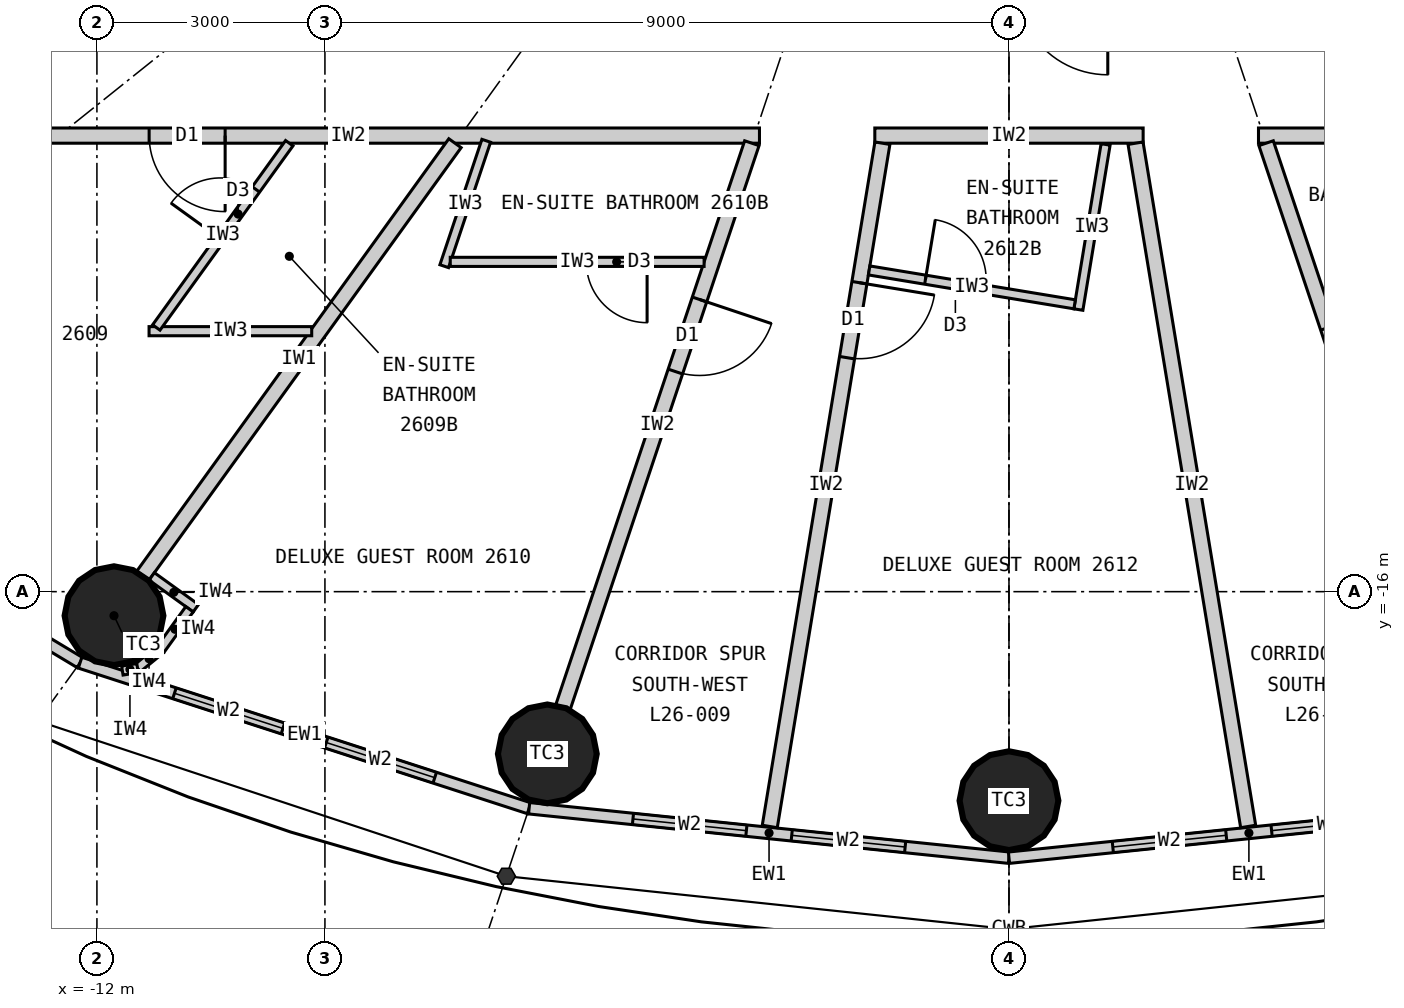
"""IFC4 building model, lengths in metres.
Left out: names, types, materials, properties, quantities, classifications, styles, units other than length and angle.
Written with IfcOpenShell. Run it as: python <this file> out.ifc"""

import sys

from ifc_helpers import new_model, si_unit, direction, frame, frame_2d, origin, origin_2d, place, context, subcontext, project, spatial, rectangle, circle, extrude, element, fill, save


model = new_model("IFC4")
c1 = context("Model", 3, precision=1e-05, world=origin(), true_north=direction((0.0, 1.0)))
c2 = subcontext(c1, "Body", "Model", "MODEL_VIEW")
j1 = project(units=[si_unit("LENGTHUNIT", "METRE"), si_unit("PLANEANGLEUNIT", "RADIAN")], contexts=[c1])
p1 = place(None, origin())
s1 = spatial("IfcSite", under=j1, at=p1, CompositionType="ELEMENT")
p2 = place(p1, origin())
s2 = spatial("IfcBuilding", under=s1, at=p2, CompositionType="ELEMENT")
p3 = place(p2, frame((0.0, 0.0, 105.6)))
s3 = spatial("IfcBuildingStorey", under=s2, at=p3, CompositionType="ELEMENT", Elevation=105.6)
for number, where, z_axis, x_axis in (
    (1, (-11.775, -16.316, 0.0), (0.0, 0.0, 1.0), (1.0, 0.0, 0.0)),
    (2, (-6.074, -18.135, 0.0), (0.0, 0.0, 1.0), (1.0, 0.0, 0.0)),
    (3, (0.0, -18.75, 0.0), (0.0, 0.0, 1.0), (1.0, 0.0, 0.0)),
):
    element("IfcColumn", number, at=place(p3, frame(where, z_axis=z_axis, x_axis=x_axis)), inside=s3, PredefinedType="COLUMN", context=c2, shape_type="SweptSolid", body=[
        extrude(circle(Radius=0.65, at=origin_2d()), origin(), (0.0, 0.0, 1.0), 3.3),
    ])
p4 = place(p3, frame((-17.332, -13.866, 0.0), z_axis=(0.0, 0.0, 1.0), x_axis=(0.857308573723, -0.514802884044, 0.0)))
e4 = element("IfcWall", 4, at=p4, inside=s3, PredefinedType="ELEMENTEDWALL", context=c2, shape_type="SweptSolid", body=[
    extrude(rectangle(XDim=5.961, YDim=0.15, at=frame_2d((2.98, 0.0))), origin(), (0.0, 0.0, 1.0), 3.12),
])
p5 = place(p4, frame((1.181, 0.0, 0.9)))
e5 = element("IfcOpeningElement", 5, at=p5, cuts=e4, PredefinedType="OPENING", context=c2, shape_type="SweptSolid", body=[
    extrude(rectangle(XDim=1.5, YDim=1.9, at=frame_2d((0.75, 0.95))), frame((0.0, 0.085, 0.0), z_axis=(0.0, -1.0, 0.0), x_axis=(1.0, 0.0, 0.0)), (0.0, 0.0, 1.0), 0.17),
])
p6 = place(p4, frame((3.281, 0.0, 0.9)))
e6 = element("IfcOpeningElement", 6, at=p6, cuts=e4, PredefinedType="OPENING", context=c2, shape_type="SweptSolid", body=[
    extrude(rectangle(XDim=1.5, YDim=1.9, at=frame_2d((0.75, 0.95))), frame((0.0, 0.085, 0.0), z_axis=(0.0, -1.0, 0.0), x_axis=(1.0, 0.0, 0.0)), (0.0, 0.0, 1.0), 0.17),
])
p7 = place(p3, frame((-12.221, -16.935, 0.0), z_axis=(0.0, 0.0, 1.0), x_axis=(0.951272691506, -0.308350881944, 0.0)))
e7 = element("IfcWall", 7, at=p7, inside=s3, PredefinedType="ELEMENTEDWALL", context=c2, shape_type="SweptSolid", body=[
    extrude(rectangle(XDim=6.211, YDim=0.15, at=frame_2d((3.105, 0.0))), origin(), (0.0, 0.0, 1.0), 3.12),
])
p8 = place(p7, frame((1.305, 0.0, 0.9)))
e8 = element("IfcOpeningElement", 8, at=p8, cuts=e7, PredefinedType="OPENING", context=c2, shape_type="SweptSolid", body=[
    extrude(rectangle(XDim=1.5, YDim=1.9, at=frame_2d((0.75, 0.95))), frame((0.0, 0.085, 0.0), z_axis=(0.0, -1.0, 0.0), x_axis=(1.0, 0.0, 0.0)), (0.0, 0.0, 1.0), 0.17),
])
p9 = place(p7, frame((3.405, 0.0, 0.9)))
e9 = element("IfcOpeningElement", 9, at=p9, cuts=e7, PredefinedType="OPENING", context=c2, shape_type="SweptSolid", body=[
    extrude(rectangle(XDim=1.5, YDim=1.9, at=frame_2d((0.75, 0.95))), frame((0.0, 0.085, 0.0), z_axis=(0.0, -1.0, 0.0), x_axis=(1.0, 0.0, 0.0)), (0.0, 0.0, 1.0), 0.17),
])
p10 = place(p3, frame((-6.313, -18.85, 0.0), z_axis=(0.0, 0.0, 1.0), x_axis=(0.994735690163, -0.102473931887, 0.0)))
e10 = element("IfcWall", 10, at=p10, inside=s3, PredefinedType="ELEMENTEDWALL", context=c2, shape_type="SweptSolid", body=[
    extrude(rectangle(XDim=6.347, YDim=0.15, at=frame_2d((3.173, 0.0))), origin(), (0.0, 0.0, 1.0), 3.12),
])
p11 = place(p10, frame((1.373, 0.0, 0.9)))
e11 = element("IfcOpeningElement", 11, at=p11, cuts=e10, PredefinedType="OPENING", context=c2, shape_type="SweptSolid", body=[
    extrude(rectangle(XDim=1.5, YDim=1.9, at=frame_2d((0.75, 0.95))), frame((0.0, 0.085, 0.0), z_axis=(0.0, -1.0, 0.0), x_axis=(1.0, 0.0, 0.0)), (0.0, 0.0, 1.0), 0.17),
])
p12 = place(p10, frame((3.473, 0.0, 0.9)))
e12 = element("IfcOpeningElement", 12, at=p12, cuts=e10, PredefinedType="OPENING", context=c2, shape_type="SweptSolid", body=[
    extrude(rectangle(XDim=1.5, YDim=1.9, at=frame_2d((0.75, 0.95))), frame((0.0, 0.085, 0.0), z_axis=(0.0, -1.0, 0.0), x_axis=(1.0, 0.0, 0.0)), (0.0, 0.0, 1.0), 0.17),
])
p13 = place(p3, frame((0.0, -19.5, 0.0), z_axis=(0.0, 0.0, 1.0), x_axis=(0.994735690163, 0.102473931887, 0.0)))
e13 = element("IfcWall", 13, at=p13, inside=s3, PredefinedType="ELEMENTEDWALL", context=c2, shape_type="SweptSolid", body=[
    extrude(rectangle(XDim=6.347, YDim=0.15, at=frame_2d((3.173, 0.0))), origin(), (0.0, 0.0, 1.0), 3.12),
])
p14 = place(p13, frame((1.373, 0.0, 0.9)))
e14 = element("IfcOpeningElement", 14, at=p14, cuts=e13, PredefinedType="OPENING", context=c2, shape_type="SweptSolid", body=[
    extrude(rectangle(XDim=1.5, YDim=1.9, at=frame_2d((0.75, 0.95))), frame((0.0, 0.085, 0.0), z_axis=(0.0, -1.0, 0.0), x_axis=(1.0, 0.0, 0.0)), (0.0, 0.0, 1.0), 0.17),
])
p15 = place(p13, frame((3.473, 0.0, 0.9)))
e15 = element("IfcOpeningElement", 15, at=p15, cuts=e13, PredefinedType="OPENING", context=c2, shape_type="SweptSolid", body=[
    extrude(rectangle(XDim=1.5, YDim=1.9, at=frame_2d((0.75, 0.95))), frame((0.0, 0.085, 0.0), z_axis=(0.0, -1.0, 0.0), x_axis=(1.0, 0.0, 0.0)), (0.0, 0.0, 1.0), 0.17),
])
p16 = place(p3, frame((14.1, -10.0, 0.0), z_axis=(0.0, 0.0, 1.0), x_axis=(-1.0, 0.0, 0.0)))
e16 = element("IfcWall", 16, at=p16, inside=s3, PredefinedType="PARTITIONING", context=c2, shape_type="SweptSolid", body=[
    extrude(rectangle(XDim=10.817, YDim=0.2, at=frame_2d((5.409, 0.0))), origin(), (0.0, 0.0, 1.0), 3.12),
])
p17 = place(p3, frame((1.765, -10.0, 0.0), z_axis=(0.0, 0.0, 1.0), x_axis=(-1.0, 0.0, 0.0)))
e17 = element("IfcWall", 17, at=p17, inside=s3, PredefinedType="PARTITIONING", context=c2, shape_type="SweptSolid", body=[
    extrude(rectangle(XDim=3.53, YDim=0.2, at=frame_2d((1.765, 0.0))), origin(), (0.0, 0.0, 1.0), 3.12),
])
p18 = place(p3, frame((-3.283, -10.0, 0.0), z_axis=(0.0, 0.0, 1.0), x_axis=(-1.0, 0.0, 0.0)))
e18 = element("IfcWall", 18, at=p18, inside=s3, PredefinedType="PARTITIONING", context=c2, shape_type="SweptSolid", body=[
    extrude(rectangle(XDim=10.817, YDim=0.2, at=frame_2d((5.409, 0.0))), origin(), (0.0, 0.0, 1.0), 3.12),
])
p19 = place(p18, frame((7.03, 0.0, 0.0)))
e19 = element("IfcOpeningElement", 19, at=p19, cuts=e18, PredefinedType="OPENING", context=c2, shape_type="SweptSolid", body=[
    extrude(rectangle(XDim=1.0, YDim=2.2, at=frame_2d((0.5, 1.1))), frame((0.0, 0.11, 0.0), z_axis=(0.0, -1.0, 0.0), x_axis=(1.0, 0.0, 0.0)), (0.0, 0.0, 1.0), 0.22),
])
p20 = place(p3, frame((-7.289, -10.1, 0.0), z_axis=(0.0, 0.0, 1.0), x_axis=(-0.585217367024, -0.81087645997, 0.0)))
e20 = element("IfcWall", 20, at=p20, inside=s3, PredefinedType="PARTITIONING", context=c2, shape_type="SweptSolid", body=[
    extrude(rectangle(XDim=7.016, YDim=0.2, at=frame_2d((3.508, 0.0))), origin(), (0.0, 0.0, 1.0), 2.27),
])
p21 = place(p3, frame((-3.383, -10.1, 0.0), z_axis=(0.0, 0.0, 1.0), x_axis=(-0.317603705574, -0.948223542318, 0.0)))
e21 = element("IfcWall", 21, at=p21, inside=s3, PredefinedType="PARTITIONING", context=c2, shape_type="SweptSolid", body=[
    extrude(rectangle(XDim=7.823, YDim=0.2, at=frame_2d((3.912, 0.0))), origin(), (0.0, 0.0, 1.0), 2.27),
])
p22 = place(p21, frame((2.168, 0.0, 0.0)))
e22 = element("IfcOpeningElement", 22, at=p22, cuts=e21, PredefinedType="OPENING", context=c2, shape_type="SweptSolid", body=[
    extrude(rectangle(XDim=1.0, YDim=2.2, at=frame_2d((0.5, 1.1))), frame((0.0, 0.11, 0.0), z_axis=(0.0, -1.0, 0.0), x_axis=(1.0, 0.0, 0.0)), (0.0, 0.0, 1.0), 0.22),
])
p23 = place(p3, frame((-1.665, -10.1, 0.0), z_axis=(0.0, 0.0, 1.0), x_axis=(-0.162660519103, -0.986682094459, 0.0)))
e23 = element("IfcWall", 23, at=p23, inside=s3, PredefinedType="PARTITIONING", context=c2, shape_type="SweptSolid", body=[
    extrude(rectangle(XDim=9.111, YDim=0.2, at=frame_2d((4.555, 0.0))), origin(), (0.0, 0.0, 1.0), 3.12),
])
p24 = place(p23, frame((1.86, 0.0, 0.0)))
e24 = element("IfcOpeningElement", 24, at=p24, cuts=e23, PredefinedType="OPENING", context=c2, shape_type="SweptSolid", body=[
    extrude(rectangle(XDim=1.0, YDim=2.2, at=frame_2d((0.5, 1.1))), frame((0.0, 0.11, 0.0), z_axis=(0.0, -1.0, 0.0), x_axis=(1.0, 0.0, 0.0)), (0.0, 0.0, 1.0), 0.22),
])
p25 = place(p3, frame((1.665, -10.1, 0.0), z_axis=(0.0, 0.0, 1.0), x_axis=(0.162660519103, -0.986682094459, 0.0)))
e25 = element("IfcWall", 25, at=p25, inside=s3, PredefinedType="PARTITIONING", context=c2, shape_type="SweptSolid", body=[
    extrude(rectangle(XDim=9.111, YDim=0.2, at=frame_2d((4.555, 0.0))), origin(), (0.0, 0.0, 1.0), 3.12),
])
p26 = place(p3, frame((3.383, -10.1, 0.0), z_axis=(0.0, 0.0, 1.0), x_axis=(0.317603705574, -0.948223542318, 0.0)))
e26 = element("IfcWall", 26, at=p26, inside=s3, PredefinedType="PARTITIONING", context=c2, shape_type="SweptSolid", body=[
    extrude(rectangle(XDim=7.823, YDim=0.2, at=frame_2d((3.912, 0.0))), origin(), (0.0, 0.0, 1.0), 2.27),
])
p27 = place(p26, frame((2.56, 0.0, 0.0)))
e27 = element("IfcOpeningElement", 27, at=p27, cuts=e26, PredefinedType="OPENING", context=c2, shape_type="SweptSolid", body=[
    extrude(rectangle(XDim=1.0, YDim=2.2, at=frame_2d((0.5, 1.1))), frame((0.0, 0.11, 0.0), z_axis=(0.0, -1.0, 0.0), x_axis=(1.0, 0.0, 0.0)), (0.0, 0.0, 1.0), 0.22),
])
p28 = place(p3, frame((-9.174, -12.573, 0.0), z_axis=(0.0, 0.0, 1.0), x_axis=(-1.0, 0.0, 0.0)))
e28 = element("IfcWall", 28, at=p28, inside=s3, PredefinedType="PARTITIONING", context=c2, shape_type="SweptSolid", body=[
    extrude(rectangle(XDim=2.14, YDim=0.12, at=frame_2d((1.07, 0.0))), origin(), (0.0, 0.0, 1.0), 3.12),
])
p29 = place(p3, frame((-9.469, -10.1, 0.0), z_axis=(0.0, 0.0, 1.0), x_axis=(-0.58520133861, -0.81088802759, 0.0)))
e29 = element("IfcWall", 29, at=p29, inside=s3, PredefinedType="PARTITIONING", context=c2, shape_type="SweptSolid", body=[
    extrude(rectangle(XDim=2.99, YDim=0.12, at=frame_2d((1.495, 0.0))), origin(), (0.0, 0.0, 1.0), 3.12),
])
p30 = place(p29, frame((0.75, 0.0, 0.0)))
e30 = element("IfcOpeningElement", 30, at=p30, cuts=e29, PredefinedType="OPENING", context=c2, shape_type="SweptSolid", body=[
    extrude(rectangle(XDim=0.8, YDim=2.1, at=frame_2d((0.4, 1.05))), frame((0.0, 0.07, 0.0), z_axis=(0.0, -1.0, 0.0), x_axis=(1.0, 0.0, 0.0)), (0.0, 0.0, 1.0), 0.14),
])
p31 = place(p3, frame((-6.878, -10.068, 0.0), z_axis=(0.0, 0.0, 1.0), x_axis=(-0.317532394508, -0.948247424694, 0.0)))
e31 = element("IfcWall", 31, at=p31, inside=s3, PredefinedType="PARTITIONING", context=c2, shape_type="SweptSolid", body=[
    extrude(rectangle(XDim=1.74, YDim=0.12, at=frame_2d((0.87, 0.0))), origin(), (0.0, 0.0, 1.0), 3.12),
])
p32 = place(p3, frame((-4.011, -11.661, 0.0), z_axis=(0.0, 0.0, 1.0), x_axis=(-1.0, 0.0, 0.0)))
e32 = element("IfcWall", 32, at=p32, inside=s3, PredefinedType="PARTITIONING", context=c2, shape_type="SweptSolid", body=[
    extrude(rectangle(XDim=3.34, YDim=0.12, at=frame_2d((1.67, 0.0))), origin(), (0.0, 0.0, 1.0), 3.12),
])
p33 = place(p32, frame((0.75, 0.0, 0.0)))
e33 = element("IfcOpeningElement", 33, at=p33, cuts=e32, PredefinedType="OPENING", context=c2, shape_type="SweptSolid", body=[
    extrude(rectangle(XDim=0.8, YDim=2.1, at=frame_2d((0.4, 1.05))), frame((0.0, 0.07, 0.0), z_axis=(0.0, -1.0, 0.0), x_axis=(1.0, 0.0, 0.0)), (0.0, 0.0, 1.0), 0.14),
])
p34 = place(p3, frame((1.271, -10.116, 0.0), z_axis=(0.0, 0.0, 1.0), x_axis=(-0.162672481395, -0.986680122328, 0.0)))
e34 = element("IfcWall", 34, at=p34, inside=s3, PredefinedType="PARTITIONING", context=c2, shape_type="SweptSolid", body=[
    extrude(rectangle(XDim=2.202, YDim=0.12, at=frame_2d((1.101, 0.0))), origin(), (0.0, 0.0, 1.0), 3.12),
])
p35 = place(p3, frame((-1.84, -11.774, 0.0), z_axis=(0.0, 0.0, 1.0), x_axis=(0.986676602341, -0.162693830222, 0.0)))
e35 = element("IfcWall", 35, at=p35, inside=s3, PredefinedType="PARTITIONING", context=c2, shape_type="SweptSolid", body=[
    extrude(rectangle(XDim=2.74, YDim=0.12, at=frame_2d((1.37, 0.0))), origin(), (0.0, 0.0, 1.0), 3.12),
])
p36 = place(p35, frame((0.75, 0.0, 0.0)))
e36 = element("IfcOpeningElement", 36, at=p36, cuts=e35, PredefinedType="OPENING", context=c2, shape_type="SweptSolid", body=[
    extrude(rectangle(XDim=0.8, YDim=2.1, at=frame_2d((0.4, 1.05))), frame((0.0, 0.07, 0.0), z_axis=(0.0, -1.0, 0.0), x_axis=(1.0, 0.0, 0.0)), (0.0, 0.0, 1.0), 0.14),
])
p37 = place(p3, frame((-11.279, -15.799, 0.0), z_axis=(0.0, 0.0, 1.0), x_axis=(0.810912957127, -0.585166793285, 0.0)))
e37 = element("IfcWall", 37, at=p37, inside=s3, PredefinedType="PARTITIONING", context=c2, shape_type="SweptSolid", body=[
    extrude(rectangle(XDim=0.716, YDim=0.12, at=frame_2d((0.358, 0.0))), origin(), (0.0, 0.0, 1.0), 3.12),
])
p38 = place(p3, frame((-10.782, -16.231, 0.0), z_axis=(0.0, 0.0, 1.0), x_axis=(-0.585175102182, -0.810906961239, 0.0)))
e38 = element("IfcWall", 38, at=p38, inside=s3, PredefinedType="PARTITIONING", context=c2, shape_type="SweptSolid", body=[
    extrude(rectangle(XDim=0.65, YDim=0.12, at=frame_2d((0.325, 0.0))), origin(), (0.0, 0.0, 1.0), 3.12),
])
p39 = place(p3, frame((-11.162, -16.759, 0.0), z_axis=(0.0, 0.0, 1.0), x_axis=(-0.775178428527, -0.63174235567, 0.0)))
e39 = element("IfcWall", 39, at=p39, inside=s3, PredefinedType="PARTITIONING", context=c2, shape_type="SweptSolid", body=[
    extrude(rectangle(XDim=0.392, YDim=0.12, at=frame_2d((0.196, 0.0))), origin(), (0.0, 0.0, 1.0), 3.12),
])
p40 = place(p3, frame((-11.466, -17.006, 0.0), z_axis=(0.0, 0.0, 1.0), x_axis=(-0.987228877621, -0.15930832744, 0.0)))
e40 = element("IfcWall", 40, at=p40, inside=s3, PredefinedType="PARTITIONING", context=c2, shape_type="SweptSolid", body=[
    extrude(rectangle(XDim=0.202, YDim=0.12, at=frame_2d((0.101, 0.0))), origin(), (0.0, 0.0, 1.0), 3.12),
])
p41 = place(p8, origin())
e41 = element("IfcWindow", 41, at=p41, inside=s3, PartitioningType="SINGLE_PANEL", PredefinedType="WINDOW", context=c2, shape_type="SweptSolid", body=[
    extrude(rectangle(XDim=1.5, YDim=1.9, at=frame_2d((0.75, 0.95))), frame((0.0, 0.03, 0.0), z_axis=(0.0, -1.0, 0.0), x_axis=(1.0, 0.0, 0.0)), (0.0, 0.0, 1.0), 0.06),
])
fill(e8, e41)
p42 = place(p9, origin())
e42 = element("IfcWindow", 42, at=p42, inside=s3, PartitioningType="SINGLE_PANEL", PredefinedType="WINDOW", context=c2, shape_type="SweptSolid", body=[
    extrude(rectangle(XDim=1.5, YDim=1.9, at=frame_2d((0.75, 0.95))), frame((0.0, 0.03, 0.0), z_axis=(0.0, -1.0, 0.0), x_axis=(1.0, 0.0, 0.0)), (0.0, 0.0, 1.0), 0.06),
])
fill(e9, e42)
p43 = place(p11, origin())
e43 = element("IfcWindow", 43, at=p43, inside=s3, PartitioningType="SINGLE_PANEL", PredefinedType="WINDOW", context=c2, shape_type="SweptSolid", body=[
    extrude(rectangle(XDim=1.5, YDim=1.9, at=frame_2d((0.75, 0.95))), frame((0.0, 0.03, 0.0), z_axis=(0.0, -1.0, 0.0), x_axis=(1.0, 0.0, 0.0)), (0.0, 0.0, 1.0), 0.06),
])
fill(e11, e43)
p44 = place(p12, origin())
e44 = element("IfcWindow", 44, at=p44, inside=s3, PartitioningType="SINGLE_PANEL", PredefinedType="WINDOW", context=c2, shape_type="SweptSolid", body=[
    extrude(rectangle(XDim=1.5, YDim=1.9, at=frame_2d((0.75, 0.95))), frame((0.0, 0.03, 0.0), z_axis=(0.0, -1.0, 0.0), x_axis=(1.0, 0.0, 0.0)), (0.0, 0.0, 1.0), 0.06),
])
fill(e12, e44)
p45 = place(p14, origin())
e45 = element("IfcWindow", 45, at=p45, inside=s3, PartitioningType="SINGLE_PANEL", PredefinedType="WINDOW", context=c2, shape_type="SweptSolid", body=[
    extrude(rectangle(XDim=1.5, YDim=1.9, at=frame_2d((0.75, 0.95))), frame((0.0, 0.03, 0.0), z_axis=(0.0, -1.0, 0.0), x_axis=(1.0, 0.0, 0.0)), (0.0, 0.0, 1.0), 0.06),
])
fill(e14, e45)
p46 = place(p15, origin())
e46 = element("IfcWindow", 46, at=p46, inside=s3, PartitioningType="SINGLE_PANEL", PredefinedType="WINDOW", context=c2, shape_type="SweptSolid", body=[
    extrude(rectangle(XDim=1.5, YDim=1.9, at=frame_2d((0.75, 0.95))), frame((0.0, 0.03, 0.0), z_axis=(0.0, -1.0, 0.0), x_axis=(1.0, 0.0, 0.0)), (0.0, 0.0, 1.0), 0.06),
])
fill(e15, e46)
p47 = place(p30, origin())
e47 = element("IfcDoor", 47, at=p47, inside=s3, OperationType="SINGLE_SWING_RIGHT", PredefinedType="DOOR", context=c2, shape_type="SweptSolid", body=[
    extrude(rectangle(XDim=0.8, YDim=2.1, at=frame_2d((0.4, 1.05))), frame((0.0, 0.025, 0.0), z_axis=(0.0, -1.0, 0.0), x_axis=(1.0, 0.0, 0.0)), (0.0, 0.0, 1.0), 0.05),
])
fill(e30, e47)
p48 = place(p19, origin())
e48 = element("IfcDoor", 48, at=p48, inside=s3, OperationType="SINGLE_SWING_LEFT", PredefinedType="DOOR", context=c2, shape_type="SweptSolid", body=[
    extrude(rectangle(XDim=1.0, YDim=2.2, at=frame_2d((0.5, 1.1))), frame((0.0, 0.025, 0.0), z_axis=(0.0, -1.0, 0.0), x_axis=(1.0, 0.0, 0.0)), (0.0, 0.0, 1.0), 0.05),
])
fill(e19, e48)
p49 = place(p33, origin())
e49 = element("IfcDoor", 49, at=p49, inside=s3, OperationType="SINGLE_SWING_LEFT", PredefinedType="DOOR", context=c2, shape_type="SweptSolid", body=[
    extrude(rectangle(XDim=0.8, YDim=2.1, at=frame_2d((0.4, 1.05))), frame((0.0, 0.025, 0.0), z_axis=(0.0, -1.0, 0.0), x_axis=(1.0, 0.0, 0.0)), (0.0, 0.0, 1.0), 0.05),
])
fill(e33, e49)
p50 = place(p22, origin())
e50 = element("IfcDoor", 50, at=p50, inside=s3, OperationType="SINGLE_SWING_LEFT", PredefinedType="DOOR", context=c2, shape_type="SweptSolid", body=[
    extrude(rectangle(XDim=1.0, YDim=2.2, at=frame_2d((0.5, 1.1))), frame((0.0, 0.025, 0.0), z_axis=(0.0, -1.0, 0.0), x_axis=(1.0, 0.0, 0.0)), (0.0, 0.0, 1.0), 0.05),
])
fill(e22, e50)
p51 = place(p36, origin())
e51 = element("IfcDoor", 51, at=p51, inside=s3, OperationType="SINGLE_SWING_LEFT", PredefinedType="DOOR", context=c2, shape_type="SweptSolid", body=[
    extrude(rectangle(XDim=0.8, YDim=2.1, at=frame_2d((0.4, 1.05))), frame((0.0, 0.025, 0.0), z_axis=(0.0, -1.0, 0.0), x_axis=(1.0, 0.0, 0.0)), (0.0, 0.0, 1.0), 0.05),
])
fill(e36, e51)
p52 = place(p24, origin())
e52 = element("IfcDoor", 52, at=p52, inside=s3, OperationType="SINGLE_SWING_LEFT", PredefinedType="DOOR", context=c2, shape_type="SweptSolid", body=[
    extrude(rectangle(XDim=1.0, YDim=2.2, at=frame_2d((0.5, 1.1))), frame((0.0, 0.025, 0.0), z_axis=(0.0, -1.0, 0.0), x_axis=(1.0, 0.0, 0.0)), (0.0, 0.0, 1.0), 0.05),
])
fill(e24, e52)
save(model, sys.argv[1])
